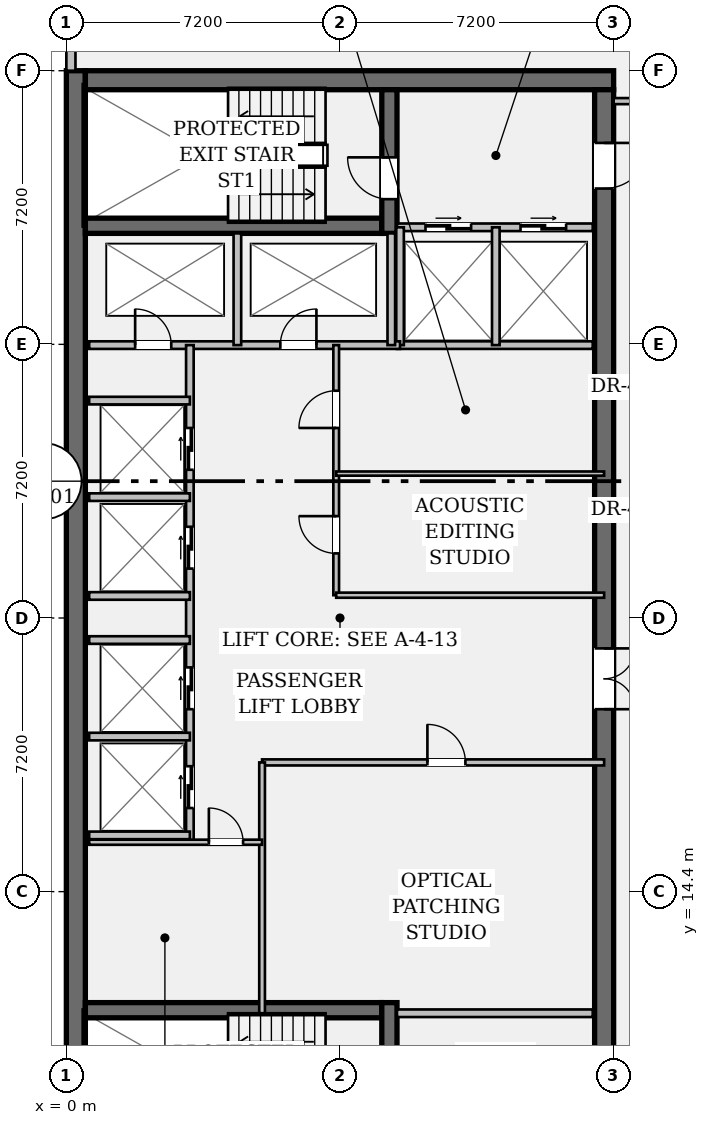
"""IFC4 building model, lengths in metres.
Left out: names, types, materials, properties, quantities, classifications, styles, units other than length and angle.
Written with IfcOpenShell. Run it as: python <this file> out.ifc"""

import sys

from ifc_helpers import new_model, si_unit, direction, frame, frame_2d, origin, place, context, subcontext, project, spatial, rectangle, extrude, element, fill, save


model = new_model("IFC4")
c1 = context("Model", 3, precision=1e-05, world=origin(), true_north=direction((0.0, 1.0)))
c2 = subcontext(c1, "Body", "Model", "MODEL_VIEW")
j1 = project(units=[si_unit("LENGTHUNIT", "METRE"), si_unit("PLANEANGLEUNIT", "RADIAN")], contexts=[c1])
p1 = place(None, origin())
s1 = spatial("IfcSite", under=j1, at=p1, CompositionType="ELEMENT")
p2 = place(p1, origin())
s2 = spatial("IfcBuilding", under=s1, at=p2, CompositionType="ELEMENT")
p3 = place(p2, frame((0.0, 0.0, 248.15)))
s3 = spatial("IfcBuildingStorey", under=s2, at=p3, CompositionType="ELEMENT", Elevation=248.15)
p4 = place(p3, frame((0.25, 7.2, 0.0), z_axis=(0.0, 0.0, 1.0), x_axis=(0.0, 1.0, 0.0)))
e1 = element("IfcWall", 1, at=p4, inside=s3, PredefinedType="SHEAR", context=c2, shape_type="SweptSolid", body=[
    extrude(rectangle(XDim=28.8, YDim=0.5, at=frame_2d((14.4, 0.0))), origin(), (0.0, 0.0, 1.0), 3.24),
])
p5 = place(p3, frame((0.5, 35.75, 0.0), z_axis=(0.0, 0.0, 1.0), x_axis=(1.0, 0.0, 0.0)))
e2 = element("IfcWall", 2, at=p5, inside=s3, PredefinedType="SHEAR", context=c2, shape_type="SweptSolid", body=[
    extrude(rectangle(XDim=13.9, YDim=0.5, at=frame_2d((6.95, 0.0))), origin(), (0.0, 0.0, 1.0), 3.24),
])
p6 = place(p3, frame((14.15, 35.5, 0.0), z_axis=(0.0, 0.0, 1.0), x_axis=(0.0, -1.0, 0.0)))
e3 = element("IfcWall", 3, at=p6, inside=s3, PredefinedType="SHEAR", context=c2, shape_type="SweptSolid", body=[
    extrude(rectangle(XDim=27.8, YDim=0.5, at=frame_2d((13.9, 0.0))), origin(), (0.0, 0.0, 1.0), 3.24),
])
p7 = place(p6, frame((1.4, 0.0, 0.0)))
e4 = element("IfcOpeningElement", 4, at=p7, cuts=e3, PredefinedType="OPENING", context=c2, shape_type="SweptSolid", body=[
    extrude(rectangle(XDim=1.2, YDim=2.15, at=frame_2d((0.6, 1.075))), frame((0.0, 0.262, 0.0), z_axis=(0.0, -1.0, 0.0), x_axis=(1.0, 0.0, 0.0)), (0.0, 0.0, 1.0), 0.524),
])
p8 = place(p6, frame((25.35, 0.0, 0.0)))
e5 = element("IfcOpeningElement", 5, at=p8, cuts=e3, PredefinedType="OPENING", context=c2, shape_type="SweptSolid", body=[
    extrude(rectangle(XDim=1.2, YDim=2.15, at=frame_2d((0.6, 1.075))), frame((0.0, 0.262, 0.0), z_axis=(0.0, -1.0, 0.0), x_axis=(1.0, 0.0, 0.0)), (0.0, 0.0, 1.0), 0.524),
])
p9 = place(p6, frame((14.7, 0.0, 0.0)))
e6 = element("IfcOpeningElement", 6, at=p9, cuts=e3, PredefinedType="OPENING", context=c2, shape_type="SweptSolid", body=[
    extrude(rectangle(XDim=1.6, YDim=2.2, at=frame_2d((0.8, 1.1))), frame((0.0, 0.262, 0.0), z_axis=(0.0, -1.0, 0.0), x_axis=(1.0, 0.0, 0.0)), (0.0, 0.0, 1.0), 0.524),
])
for number, where, z_axis, x_axis in (
    (7, (0.5, 31.92, 0.0), (0.0, 0.0, 1.0), (1.0, 0.0, 0.0)),
    (8, (0.5, 11.28, 0.0), (0.0, 0.0, 1.0), (1.0, 0.0, 0.0)),
):
    element("IfcWall", number, at=place(p3, frame(where, z_axis=z_axis, x_axis=x_axis)), inside=s3, PredefinedType="SHEAR", context=c2, shape_type="SweptSolid", body=[
        extrude(rectangle(XDim=7.8, YDim=0.4, at=frame_2d((3.9, 0.0))), origin(), (0.0, 0.0, 1.0), 3.24),
    ])
p10 = place(p3, frame((8.5, 31.72, 0.0), z_axis=(0.0, 0.0, 1.0), x_axis=(0.0, 1.0, 0.0)))
e9 = element("IfcWall", 9, at=p10, inside=s3, PredefinedType="SHEAR", context=c2, shape_type="SweptSolid", body=[
    extrude(rectangle(XDim=3.78, YDim=0.4, at=frame_2d((1.89, 0.0))), origin(), (0.0, 0.0, 1.0), 3.24),
])
p11 = place(p10, frame((0.9, 0.0, 0.0)))
e10 = element("IfcOpeningElement", 10, at=p11, cuts=e9, PredefinedType="OPENING", context=c2, shape_type="SweptSolid", body=[
    extrude(rectangle(XDim=1.1, YDim=2.15, at=frame_2d((0.55, 1.075))), frame((0.0, 0.212, 0.0), z_axis=(0.0, -1.0, 0.0), x_axis=(1.0, 0.0, 0.0)), (0.0, 0.0, 1.0), 0.424),
])
p12 = place(p3, frame((8.5, 7.7, 0.0), z_axis=(0.0, 0.0, 1.0), x_axis=(0.0, 1.0, 0.0)))
e11 = element("IfcWall", 11, at=p12, inside=s3, PredefinedType="SHEAR", context=c2, shape_type="SweptSolid", body=[
    extrude(rectangle(XDim=3.78, YDim=0.4, at=frame_2d((1.89, 0.0))), origin(), (0.0, 0.0, 1.0), 3.24),
])
p13 = place(p12, frame((0.85, 0.0, 0.0)))
e12 = element("IfcOpeningElement", 12, at=p13, cuts=e11, PredefinedType="OPENING", context=c2, shape_type="SweptSolid", body=[
    extrude(rectangle(XDim=1.1, YDim=2.15, at=frame_2d((0.55, 1.075))), frame((0.0, 0.212, 0.0), z_axis=(0.0, -1.0, 0.0), x_axis=(1.0, 0.0, 0.0)), (0.0, 0.0, 1.0), 0.424),
])
p14 = place(p3, frame((0.12, 36.0, 0.0), z_axis=(0.0, 0.0, 1.0), x_axis=(0.0, 1.0, 0.0)))
e13 = element("IfcWall", 13, at=p14, inside=s3, PredefinedType="STANDARD", context=c2, shape_type="SweptSolid", body=[
    extrude(rectangle(XDim=1.13, YDim=0.24, at=frame_2d((0.565, 0.0))), origin(), (0.0, 0.0, 1.0), 3.24),
])
p15 = place(p3, frame((8.7, 31.88, 0.0), z_axis=(0.0, 0.0, 1.0), x_axis=(1.0, 0.0, 0.0)))
e14 = element("IfcWall", 14, at=p15, inside=s3, PredefinedType="PARTITIONING", context=c2, shape_type="SweptSolid", body=[
    extrude(rectangle(XDim=5.15, YDim=0.2, at=frame_2d((2.575, 0.0))), origin(), (0.0, 0.0, 1.0), 3.24),
])
p16 = place(p15, frame((0.75, 0.0, 0.0)))
e15 = element("IfcOpeningElement", 15, at=p16, cuts=e14, PredefinedType="OPENING", context=c2, shape_type="SweptSolid", body=[
    extrude(rectangle(XDim=1.2, YDim=2.2, at=frame_2d((0.6, 1.1))), frame((0.0, 0.112, 0.0), z_axis=(0.0, -1.0, 0.0), x_axis=(1.0, 0.0, 0.0)), (0.0, 0.0, 1.0), 0.224),
])
p17 = place(p15, frame((3.25, 0.0, 0.0)))
e16 = element("IfcOpeningElement", 16, at=p17, cuts=e14, PredefinedType="OPENING", context=c2, shape_type="SweptSolid", body=[
    extrude(rectangle(XDim=1.2, YDim=2.2, at=frame_2d((0.6, 1.1))), frame((0.0, 0.112, 0.0), z_axis=(0.0, -1.0, 0.0), x_axis=(1.0, 0.0, 0.0)), (0.0, 0.0, 1.0), 0.224),
])
for number, where, z_axis, x_axis in (
    (17, (8.7, 11.2, 0.0), (0.0, 0.0, 1.0), (1.0, 0.0, 0.0)),
    (18, (8.7, 28.78, 0.0), (0.0, 0.0, 1.0), (1.0, 0.0, 0.0)),
):
    element("IfcWall", number, at=place(p3, frame(where, z_axis=z_axis, x_axis=x_axis)), inside=s3, PredefinedType="PARTITIONING", context=c2, shape_type="SweptSolid", body=[
        extrude(rectangle(XDim=5.15, YDim=0.2, at=frame_2d((2.575, 0.0))), origin(), (0.0, 0.0, 1.0), 3.24),
    ])
for number, where, z_axis, x_axis in (
    (19, (8.78, 28.78, 0.0), (0.0, 0.0, 1.0), (0.0, 1.0, 0.0)),
    (20, (11.3, 28.78, 0.0), (0.0, 0.0, 1.0), (0.0, 1.0, 0.0)),
):
    element("IfcWall", number, at=place(p3, frame(where, z_axis=z_axis, x_axis=x_axis)), inside=s3, PredefinedType="PARTITIONING", context=c2, shape_type="SweptSolid", body=[
        extrude(rectangle(XDim=3.1, YDim=0.2, at=frame_2d((1.55, 0.0))), origin(), (0.0, 0.0, 1.0), 3.24),
    ])
p18 = place(p3, frame((0.6, 28.78, 0.0), z_axis=(0.0, 0.0, 1.0), x_axis=(1.0, 0.0, 0.0)))
e21 = element("IfcWall", 21, at=p18, inside=s3, PredefinedType="PARTITIONING", context=c2, shape_type="SweptSolid", body=[
    extrude(rectangle(XDim=8.18, YDim=0.2, at=frame_2d((4.09, 0.0))), origin(), (0.0, 0.0, 1.0), 3.24),
])
p19 = place(p18, frame((1.21, 0.0, 0.0)))
e22 = element("IfcOpeningElement", 22, at=p19, cuts=e21, PredefinedType="OPENING", context=c2, shape_type="SweptSolid", body=[
    extrude(rectangle(XDim=0.95, YDim=2.15, at=frame_2d((0.475, 1.075))), frame((0.0, 0.112, 0.0), z_axis=(0.0, -1.0, 0.0), x_axis=(1.0, 0.0, 0.0)), (0.0, 0.0, 1.0), 0.224),
])
p20 = place(p18, frame((5.03, 0.0, 0.0)))
e23 = element("IfcOpeningElement", 23, at=p20, cuts=e21, PredefinedType="OPENING", context=c2, shape_type="SweptSolid", body=[
    extrude(rectangle(XDim=0.95, YDim=2.15, at=frame_2d((0.475, 1.075))), frame((0.0, 0.112, 0.0), z_axis=(0.0, -1.0, 0.0), x_axis=(1.0, 0.0, 0.0)), (0.0, 0.0, 1.0), 0.224),
])
for number, where, z_axis, x_axis in (
    (24, (4.5, 28.78, 0.0), (0.0, 0.0, 1.0), (0.0, 1.0, 0.0)),
    (25, (8.55, 28.78, 0.0), (0.0, 0.0, 1.0), (0.0, 1.0, 0.0)),
):
    element("IfcWall", number, at=place(p3, frame(where, z_axis=z_axis, x_axis=x_axis)), inside=s3, PredefinedType="PARTITIONING", context=c2, shape_type="SweptSolid", body=[
        extrude(rectangle(XDim=2.94, YDim=0.2, at=frame_2d((1.47, 0.0))), origin(), (0.0, 0.0, 1.0), 3.24),
    ])
p21 = place(p3, frame((3.25, 15.7, 0.0), z_axis=(0.0, 0.0, 1.0), x_axis=(0.0, 1.0, 0.0)))
e26 = element("IfcWall", 26, at=p21, inside=s3, PredefinedType="PARTITIONING", context=c2, shape_type="SweptSolid", body=[
    extrude(rectangle(XDim=13.08, YDim=0.2, at=frame_2d((6.54, 0.0))), origin(), (0.0, 0.0, 1.0), 3.24),
])
p22 = place(p21, frame((0.9, 0.0, 0.0)))
e27 = element("IfcOpeningElement", 27, at=p22, cuts=e26, PredefinedType="OPENING", context=c2, shape_type="SweptSolid", body=[
    extrude(rectangle(XDim=1.1, YDim=2.2, at=frame_2d((0.55, 1.1))), frame((0.0, 0.112, 0.0), z_axis=(0.0, -1.0, 0.0), x_axis=(1.0, 0.0, 0.0)), (0.0, 0.0, 1.0), 0.224),
])
p23 = place(p21, frame((3.5, 0.0, 0.0)))
e28 = element("IfcOpeningElement", 28, at=p23, cuts=e26, PredefinedType="OPENING", context=c2, shape_type="SweptSolid", body=[
    extrude(rectangle(XDim=1.1, YDim=2.2, at=frame_2d((0.55, 1.1))), frame((0.0, 0.112, 0.0), z_axis=(0.0, -1.0, 0.0), x_axis=(1.0, 0.0, 0.0)), (0.0, 0.0, 1.0), 0.224),
])
p24 = place(p21, frame((7.2, 0.0, 0.0)))
e29 = element("IfcOpeningElement", 29, at=p24, cuts=e26, PredefinedType="OPENING", context=c2, shape_type="SweptSolid", body=[
    extrude(rectangle(XDim=1.1, YDim=2.2, at=frame_2d((0.55, 1.1))), frame((0.0, 0.112, 0.0), z_axis=(0.0, -1.0, 0.0), x_axis=(1.0, 0.0, 0.0)), (0.0, 0.0, 1.0), 0.224),
])
p25 = place(p21, frame((9.8, 0.0, 0.0)))
e30 = element("IfcOpeningElement", 30, at=p25, cuts=e26, PredefinedType="OPENING", context=c2, shape_type="SweptSolid", body=[
    extrude(rectangle(XDim=1.1, YDim=2.2, at=frame_2d((0.55, 1.1))), frame((0.0, 0.112, 0.0), z_axis=(0.0, -1.0, 0.0), x_axis=(1.0, 0.0, 0.0)), (0.0, 0.0, 1.0), 0.224),
])
for number, where, z_axis, x_axis in (
    (31, (0.6, 15.88, 0.0), (0.0, 0.0, 1.0), (1.0, 0.0, 0.0)),
    (32, (0.6, 18.48, 0.0), (0.0, 0.0, 1.0), (1.0, 0.0, 0.0)),
    (33, (0.6, 22.18, 0.0), (0.0, 0.0, 1.0), (1.0, 0.0, 0.0)),
    (34, (0.6, 24.78, 0.0), (0.0, 0.0, 1.0), (1.0, 0.0, 0.0)),
    (35, (0.6, 21.02, 0.0), (0.0, 0.0, 1.0), (1.0, 0.0, 0.0)),
    (36, (0.6, 27.32, 0.0), (0.0, 0.0, 1.0), (1.0, 0.0, 0.0)),
):
    element("IfcWall", number, at=place(p3, frame(where, z_axis=z_axis, x_axis=x_axis)), inside=s3, PredefinedType="PARTITIONING", context=c2, shape_type="SweptSolid", body=[
        extrude(rectangle(XDim=2.65, YDim=0.2, at=frame_2d((1.325, 0.0))), origin(), (0.0, 0.0, 1.0), 3.24),
    ])
p26 = place(p3, frame((7.1, 22.2, 0.0), z_axis=(0.0, 0.0, 1.0), x_axis=(0.0, 1.0, 0.0)))
e37 = element("IfcWall", 37, at=p26, inside=s3, PredefinedType="PARTITIONING", context=c2, shape_type="SweptSolid", body=[
    extrude(rectangle(XDim=6.58, YDim=0.15, at=frame_2d((3.29, 0.0))), origin(), (0.0, 0.0, 1.0), 3.24),
])
p27 = place(p26, frame((1.1, 0.0, 0.0)))
e38 = element("IfcOpeningElement", 38, at=p27, cuts=e37, PredefinedType="OPENING", context=c2, shape_type="SweptSolid", body=[
    extrude(rectangle(XDim=0.98, YDim=2.15, at=frame_2d((0.49, 1.075))), frame((0.0, 0.087, 0.0), z_axis=(0.0, -1.0, 0.0), x_axis=(1.0, 0.0, 0.0)), (0.0, 0.0, 1.0), 0.174),
])
p28 = place(p26, frame((4.4, 0.0, 0.0)))
e39 = element("IfcOpeningElement", 39, at=p28, cuts=e37, PredefinedType="OPENING", context=c2, shape_type="SweptSolid", body=[
    extrude(rectangle(XDim=0.98, YDim=2.15, at=frame_2d((0.49, 1.075))), frame((0.0, 0.087, 0.0), z_axis=(0.0, -1.0, 0.0), x_axis=(1.0, 0.0, 0.0)), (0.0, 0.0, 1.0), 0.174),
])
p29 = place(p3, frame((7.1, 22.2, 0.0), z_axis=(0.0, 0.0, 1.0), x_axis=(1.0, 0.0, 0.0)))
e40 = element("IfcWall", 40, at=p29, inside=s3, PredefinedType="PARTITIONING", context=c2, shape_type="SweptSolid", body=[
    extrude(rectangle(XDim=7.05, YDim=0.135, at=frame_2d((3.525, 0.0))), origin(), (0.0, 0.0, 1.0), 3.24),
])
p30 = place(p3, frame((7.1, 25.4, 0.0), z_axis=(0.0, 0.0, 1.0), x_axis=(1.0, 0.0, 0.0)))
e41 = element("IfcWall", 41, at=p30, inside=s3, PredefinedType="PARTITIONING", context=c2, shape_type="SweptSolid", body=[
    extrude(rectangle(XDim=7.05, YDim=0.11, at=frame_2d((3.525, 0.0))), origin(), (0.0, 0.0, 1.0), 3.24),
])
p31 = place(p3, frame((5.15, 17.8, 0.0), z_axis=(0.0, 0.0, 1.0), x_axis=(1.0, 0.0, 0.0)))
e42 = element("IfcWall", 42, at=p31, inside=s3, PredefinedType="PARTITIONING", context=c2, shape_type="SweptSolid", body=[
    extrude(rectangle(XDim=9.0, YDim=0.16, at=frame_2d((4.5, 0.0))), origin(), (0.0, 0.0, 1.0), 3.24),
])
p32 = place(p31, frame((4.35, 0.0, 0.0)))
e43 = element("IfcOpeningElement", 43, at=p32, cuts=e42, PredefinedType="OPENING", context=c2, shape_type="SweptSolid", body=[
    extrude(rectangle(XDim=1.0, YDim=2.15, at=frame_2d((0.5, 1.075))), frame((0.0, 0.092, 0.0), z_axis=(0.0, -1.0, 0.0), x_axis=(1.0, 0.0, 0.0)), (0.0, 0.0, 1.0), 0.184),
])
p33 = place(p3, frame((5.15, 11.2, 0.0), z_axis=(0.0, 0.0, 1.0), x_axis=(0.0, 1.0, 0.0)))
e44 = element("IfcWall", 44, at=p33, inside=s3, PredefinedType="PARTITIONING", context=c2, shape_type="SweptSolid", body=[
    extrude(rectangle(XDim=6.6, YDim=0.15, at=frame_2d((3.3, 0.0))), origin(), (0.0, 0.0, 1.0), 3.24),
])
p34 = place(p3, frame((0.6, 15.7, 0.0), z_axis=(0.0, 0.0, 1.0), x_axis=(1.0, 0.0, 0.0)))
e45 = element("IfcWall", 45, at=p34, inside=s3, PredefinedType="PARTITIONING", context=c2, shape_type="SweptSolid", body=[
    extrude(rectangle(XDim=4.55, YDim=0.135, at=frame_2d((2.275, 0.0))), origin(), (0.0, 0.0, 1.0), 3.24),
])
p35 = place(p34, frame((3.15, 0.0, 0.0)))
e46 = element("IfcOpeningElement", 46, at=p35, cuts=e45, PredefinedType="OPENING", context=c2, shape_type="SweptSolid", body=[
    extrude(rectangle(XDim=0.9, YDim=2.15, at=frame_2d((0.45, 1.075))), frame((0.0, 0.08, 0.0), z_axis=(0.0, -1.0, 0.0), x_axis=(1.0, 0.0, 0.0)), (0.0, 0.0, 1.0), 0.159),
])
p36 = place(p3, frame((14.4, 35.2, 0.0), z_axis=(0.0, 0.0, 1.0), x_axis=(1.0, 0.0, 0.0)))
e47 = element("IfcWall", 47, at=p36, inside=s3, PredefinedType="PARTITIONING", context=c2, shape_type="SweptSolid", body=[
    extrude(rectangle(XDim=2.95, YDim=0.16, at=frame_2d((1.475, 0.0))), origin(), (0.0, 0.0, 1.0), 2.808),
])
p37 = place(p36, frame((0.95, 0.0, 0.0)))
e48 = element("IfcOpeningElement", 48, at=p37, cuts=e47, PredefinedType="OPENING", context=c2, shape_type="SweptSolid", body=[
    extrude(rectangle(XDim=1.0, YDim=2.15, at=frame_2d((0.5, 1.075))), frame((0.0, 0.092, 0.0), z_axis=(0.0, -1.0, 0.0), x_axis=(1.0, 0.0, 0.0)), (0.0, 0.0, 1.0), 0.184),
])
p38 = place(p11, origin())
e49 = element("IfcDoor", 49, at=p38, inside=s3, OperationType="SINGLE_SWING_RIGHT", PredefinedType="DOOR", context=c2, shape_type="SweptSolid", body=[
    extrude(rectangle(XDim=1.1, YDim=2.15, at=frame_2d((0.55, 1.075))), frame((0.0, 0.025, 0.0), z_axis=(0.0, -1.0, 0.0), x_axis=(1.0, 0.0, 0.0)), (0.0, 0.0, 1.0), 0.05),
])
fill(e10, e49)
p39 = place(p7, origin())
e50 = element("IfcDoor", 50, at=p39, inside=s3, OperationType="SINGLE_SWING_LEFT", PredefinedType="DOOR", context=c2, shape_type="SweptSolid", body=[
    extrude(rectangle(XDim=1.2, YDim=2.15, at=frame_2d((0.6, 1.075))), frame((0.0, 0.025, 0.0), z_axis=(0.0, -1.0, 0.0), x_axis=(1.0, 0.0, 0.0)), (0.0, 0.0, 1.0), 0.05),
])
fill(e4, e50)
p40 = place(p16, origin())
e51 = element("IfcDoor", 51, at=p40, inside=s3, OperationType="DOUBLE_DOOR_SLIDING", PredefinedType="DOOR", context=c2, shape_type="SweptSolid", body=[
    extrude(rectangle(XDim=1.2, YDim=2.2, at=frame_2d((0.6, 1.1))), frame((0.0, 0.025, 0.0), z_axis=(0.0, -1.0, 0.0), x_axis=(1.0, 0.0, 0.0)), (0.0, 0.0, 1.0), 0.05),
])
fill(e15, e51)
p41 = place(p17, origin())
e52 = element("IfcDoor", 52, at=p41, inside=s3, OperationType="DOUBLE_DOOR_SLIDING", PredefinedType="DOOR", context=c2, shape_type="SweptSolid", body=[
    extrude(rectangle(XDim=1.2, YDim=2.2, at=frame_2d((0.6, 1.1))), frame((0.0, 0.025, 0.0), z_axis=(0.0, -1.0, 0.0), x_axis=(1.0, 0.0, 0.0)), (0.0, 0.0, 1.0), 0.05),
])
fill(e16, e52)
p42 = place(p19, origin())
e53 = element("IfcDoor", 53, at=p42, inside=s3, OperationType="SINGLE_SWING_LEFT", PredefinedType="DOOR", context=c2, shape_type="SweptSolid", body=[
    extrude(rectangle(XDim=0.95, YDim=2.15, at=frame_2d((0.475, 1.075))), frame((0.0, 0.025, 0.0), z_axis=(0.0, -1.0, 0.0), x_axis=(1.0, 0.0, 0.0)), (0.0, 0.0, 1.0), 0.05),
])
fill(e22, e53)
p43 = place(p20, origin())
e54 = element("IfcDoor", 54, at=p43, inside=s3, OperationType="SINGLE_SWING_RIGHT", PredefinedType="DOOR", context=c2, shape_type="SweptSolid", body=[
    extrude(rectangle(XDim=0.95, YDim=2.15, at=frame_2d((0.475, 1.075))), frame((0.0, 0.025, 0.0), z_axis=(0.0, -1.0, 0.0), x_axis=(1.0, 0.0, 0.0)), (0.0, 0.0, 1.0), 0.05),
])
fill(e23, e54)
p44 = place(p9, origin())
e55 = element("IfcDoor", 55, at=p44, inside=s3, OperationType="DOUBLE_DOOR_SINGLE_SWING", PredefinedType="DOOR", context=c2, shape_type="SweptSolid", body=[
    extrude(rectangle(XDim=1.6, YDim=2.2, at=frame_2d((0.8, 1.1))), frame((0.0, 0.025, 0.0), z_axis=(0.0, -1.0, 0.0), x_axis=(1.0, 0.0, 0.0)), (0.0, 0.0, 1.0), 0.05),
])
fill(e6, e55)
p45 = place(p22, origin())
e56 = element("IfcDoor", 56, at=p45, inside=s3, OperationType="DOUBLE_DOOR_SLIDING", PredefinedType="DOOR", context=c2, shape_type="SweptSolid", body=[
    extrude(rectangle(XDim=1.1, YDim=2.2, at=frame_2d((0.55, 1.1))), frame((0.0, 0.025, 0.0), z_axis=(0.0, -1.0, 0.0), x_axis=(1.0, 0.0, 0.0)), (0.0, 0.0, 1.0), 0.05),
])
fill(e27, e56)
p46 = place(p23, origin())
e57 = element("IfcDoor", 57, at=p46, inside=s3, OperationType="DOUBLE_DOOR_SLIDING", PredefinedType="DOOR", context=c2, shape_type="SweptSolid", body=[
    extrude(rectangle(XDim=1.1, YDim=2.2, at=frame_2d((0.55, 1.1))), frame((0.0, 0.025, 0.0), z_axis=(0.0, -1.0, 0.0), x_axis=(1.0, 0.0, 0.0)), (0.0, 0.0, 1.0), 0.05),
])
fill(e28, e57)
p47 = place(p24, origin())
e58 = element("IfcDoor", 58, at=p47, inside=s3, OperationType="DOUBLE_DOOR_SLIDING", PredefinedType="DOOR", context=c2, shape_type="SweptSolid", body=[
    extrude(rectangle(XDim=1.1, YDim=2.2, at=frame_2d((0.55, 1.1))), frame((0.0, 0.025, 0.0), z_axis=(0.0, -1.0, 0.0), x_axis=(1.0, 0.0, 0.0)), (0.0, 0.0, 1.0), 0.05),
])
fill(e29, e58)
p48 = place(p25, origin())
e59 = element("IfcDoor", 59, at=p48, inside=s3, OperationType="DOUBLE_DOOR_SLIDING", PredefinedType="DOOR", context=c2, shape_type="SweptSolid", body=[
    extrude(rectangle(XDim=1.1, YDim=2.2, at=frame_2d((0.55, 1.1))), frame((0.0, 0.025, 0.0), z_axis=(0.0, -1.0, 0.0), x_axis=(1.0, 0.0, 0.0)), (0.0, 0.0, 1.0), 0.05),
])
fill(e30, e59)
p49 = place(p27, origin())
e60 = element("IfcDoor", 60, at=p49, inside=s3, OperationType="SINGLE_SWING_RIGHT", PredefinedType="DOOR", context=c2, shape_type="SweptSolid", body=[
    extrude(rectangle(XDim=0.98, YDim=2.15, at=frame_2d((0.49, 1.075))), frame((0.0, 0.025, 0.0), z_axis=(0.0, -1.0, 0.0), x_axis=(1.0, 0.0, 0.0)), (0.0, 0.0, 1.0), 0.05),
])
fill(e38, e60)
p50 = place(p28, origin())
e61 = element("IfcDoor", 61, at=p50, inside=s3, OperationType="SINGLE_SWING_LEFT", PredefinedType="DOOR", context=c2, shape_type="SweptSolid", body=[
    extrude(rectangle(XDim=0.98, YDim=2.15, at=frame_2d((0.49, 1.075))), frame((0.0, 0.025, 0.0), z_axis=(0.0, -1.0, 0.0), x_axis=(1.0, 0.0, 0.0)), (0.0, 0.0, 1.0), 0.05),
])
fill(e39, e61)
p51 = place(p32, origin())
e62 = element("IfcDoor", 62, at=p51, inside=s3, OperationType="SINGLE_SWING_LEFT", PredefinedType="DOOR", context=c2, shape_type="SweptSolid", body=[
    extrude(rectangle(XDim=1.0, YDim=2.15, at=frame_2d((0.5, 1.075))), frame((0.0, 0.025, 0.0), z_axis=(0.0, -1.0, 0.0), x_axis=(1.0, 0.0, 0.0)), (0.0, 0.0, 1.0), 0.05),
])
fill(e43, e62)
p52 = place(p35, origin())
e63 = element("IfcDoor", 63, at=p52, inside=s3, OperationType="SINGLE_SWING_LEFT", PredefinedType="DOOR", context=c2, shape_type="SweptSolid", body=[
    extrude(rectangle(XDim=0.9, YDim=2.15, at=frame_2d((0.45, 1.075))), frame((0.0, 0.025, 0.0), z_axis=(0.0, -1.0, 0.0), x_axis=(1.0, 0.0, 0.0)), (0.0, 0.0, 1.0), 0.05),
])
fill(e46, e63)
save(model, sys.argv[1])
